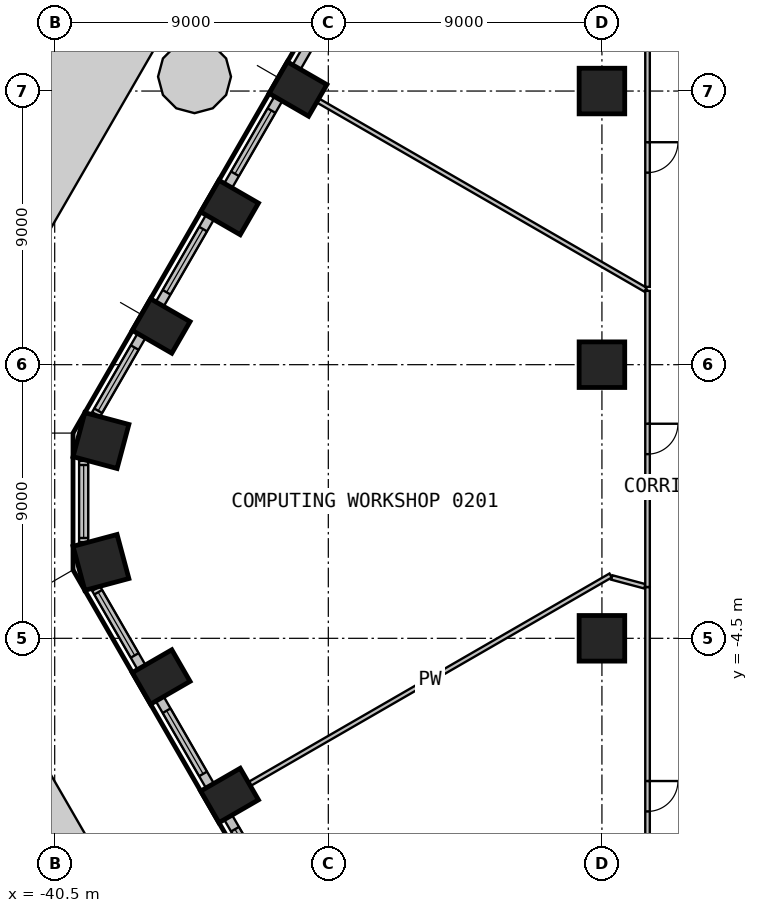
"""IFC4 building model, lengths in metres.
Left out: names, types, materials, properties, quantities, classifications, styles, units other than length and angle.
Written with IfcOpenShell. Run it as: python <this file> out.ifc"""

import sys

from ifc_helpers import new_model, si_unit, direction, frame, frame_2d, origin, origin_2d, place, context, subcontext, project, spatial, polyline, rectangle, circle, outline, extrude, element, fill, save


model = new_model("IFC4")
c1 = context("Model", 3, precision=1e-05, world=origin(), true_north=direction((0.0, 1.0)))
c2 = subcontext(c1, "Body", "Model", "MODEL_VIEW")
j1 = project(units=[si_unit("LENGTHUNIT", "METRE"), si_unit("PLANEANGLEUNIT", "RADIAN")], contexts=[c1])
p1 = place(None, origin())
s1 = spatial("IfcSite", under=j1, at=p1, CompositionType="ELEMENT")
p2 = place(p1, origin())
s2 = spatial("IfcBuilding", under=s1, at=p2, CompositionType="ELEMENT")
p3 = place(p2, frame((0.0, 0.0, 10.8)))
s3 = spatial("IfcBuildingStorey", under=s2, at=p3, CompositionType="ELEMENT", Elevation=10.8)
for number, where, z_axis, x_axis in (
    (1, (-32.498, 13.566, 0.0), (0.0, 0.0, 1.0), (-0.5, -0.866, 0.0)),
    (2, (-34.748, 9.669, 0.0), (0.0, 0.0, 1.0), (-0.5, -0.866, 0.0)),
    (3, (-36.998, 5.772, 0.0), (0.0, 0.0, 1.0), (-0.5, -0.866, 0.0)),
):
    element("IfcColumn", number, at=place(p3, frame(where, z_axis=z_axis, x_axis=x_axis)), inside=s3, PredefinedType="COLUMN", context=c2, shape_type="SweptSolid", body=[
        extrude(rectangle(XDim=1.2, YDim=1.5, at=origin_2d()), origin(), (0.0, 0.0, 1.0), 4.4),
    ])
for number, where, z_axis, x_axis in (
    (4, (-38.979, 2.004, 0.0), (0.0, 0.0, 1.0), (-0.259, -0.966, 0.0)),
    (5, (-38.979, -2.004, 0.0), (0.0, 0.0, 1.0), (0.259, -0.966, 0.0)),
):
    element("IfcColumn", number, at=place(p3, frame(where, z_axis=z_axis, x_axis=x_axis)), inside=s3, PredefinedType="COLUMN", context=c2, shape_type="SweptSolid", body=[
        extrude(rectangle(XDim=1.5, YDim=1.5, at=origin_2d()), origin(), (0.0, 0.0, 1.0), 4.4),
    ])
for number, where, z_axis, x_axis in (
    (6, (-36.998, -5.772, 0.0), (0.0, 0.0, 1.0), (0.5, -0.866, 0.0)),
    (7, (-34.748, -9.669, 0.0), (0.0, 0.0, 1.0), (0.5, -0.866, 0.0)),
):
    element("IfcColumn", number, at=place(p3, frame(where, z_axis=z_axis, x_axis=x_axis)), inside=s3, PredefinedType="COLUMN", context=c2, shape_type="SweptSolid", body=[
        extrude(rectangle(XDim=1.2, YDim=1.5, at=origin_2d()), origin(), (0.0, 0.0, 1.0), 4.4),
    ])
for number, where, z_axis, x_axis in (
    (8, (-22.5, -4.5, 0.0), (0.0, 0.0, 1.0), (1.0, 0.0, 0.0)),
    (9, (-22.5, 4.5, 0.0), (0.0, 0.0, 1.0), (1.0, 0.0, 0.0)),
    (10, (-22.5, 13.5, 0.0), (0.0, 0.0, 1.0), (1.0, 0.0, 0.0)),
):
    element("IfcColumn", number, at=place(p3, frame(where, z_axis=z_axis, x_axis=x_axis)), inside=s3, PredefinedType="COLUMN", context=c2, shape_type="SweptSolid", body=[
        extrude(circle(Radius=0.75, at=origin_2d()), origin(), (0.0, 0.0, 1.0), 4.4),
    ])
p4 = place(p3, frame((-32.544, 14.286, 0.0), z_axis=(0.0, 0.0, 1.0), x_axis=(0.499991515992, 0.866030301974, 0.0)))
e11 = element("IfcWall", 11, at=p4, inside=s3, PredefinedType="SOLIDWALL", context=c2, shape_type="SweptSolid", body=[
    extrude(rectangle(XDim=3.299, YDim=0.3, at=frame_2d((1.649, 0.0))), origin(), (0.0, 0.0, 1.0), 4.4),
])
p5 = place(p4, frame((0.75, 0.0, 0.0)))
e12 = element("IfcOpeningElement", 12, at=p5, cuts=e11, PredefinedType="OPENING", context=c2, shape_type="SweptSolid", body=[
    extrude(rectangle(XDim=1.8, YDim=2.4, at=frame_2d((0.9, 1.2))), frame((0.0, 0.16, 0.0), z_axis=(0.0, -1.0, 0.0), x_axis=(1.0, 0.0, 0.0)), (0.0, 0.0, 1.0), 0.32),
])
p6 = place(p3, frame((-33.144, 13.246, 0.0), z_axis=(0.0, 0.0, 1.0), x_axis=(-0.499991515992, -0.866030301974, 0.0)))
e13 = element("IfcWall", 13, at=p6, inside=s3, PredefinedType="SOLIDWALL", context=c2, shape_type="SweptSolid", body=[
    extrude(rectangle(XDim=3.299, YDim=0.3, at=frame_2d((1.649, 0.0))), origin(), (0.0, 0.0, 1.0), 4.4),
])
p7 = place(p6, frame((0.449, 0.0, 0.9)))
e14 = element("IfcOpeningElement", 14, at=p7, cuts=e13, PredefinedType="OPENING", context=c2, shape_type="SweptSolid", body=[
    extrude(rectangle(XDim=2.4, YDim=3.0, at=frame_2d((1.2, 1.5))), frame((0.0, 0.16, 0.0), z_axis=(0.0, -1.0, 0.0), x_axis=(1.0, 0.0, 0.0)), (0.0, 0.0, 1.0), 0.32),
])
p8 = place(p3, frame((-35.394, 9.349, 0.0), z_axis=(0.0, 0.0, 1.0), x_axis=(-0.499991515992, -0.866030301974, 0.0)))
e15 = element("IfcWall", 15, at=p8, inside=s3, PredefinedType="SOLIDWALL", context=c2, shape_type="SweptSolid", body=[
    extrude(rectangle(XDim=3.299, YDim=0.3, at=frame_2d((1.649, 0.0))), origin(), (0.0, 0.0, 1.0), 4.4),
])
p9 = place(p8, frame((0.449, 0.0, 0.9)))
e16 = element("IfcOpeningElement", 16, at=p9, cuts=e15, PredefinedType="OPENING", context=c2, shape_type="SweptSolid", body=[
    extrude(rectangle(XDim=2.4, YDim=3.0, at=frame_2d((1.2, 1.5))), frame((0.0, 0.16, 0.0), z_axis=(0.0, -1.0, 0.0), x_axis=(1.0, 0.0, 0.0)), (0.0, 0.0, 1.0), 0.32),
])
p10 = place(p3, frame((-37.644, 5.452, 0.0), z_axis=(0.0, 0.0, 1.0), x_axis=(-0.49999586137, -0.866027793211, 0.0)))
e17 = element("IfcWall", 17, at=p10, inside=s3, PredefinedType="SOLIDWALL", context=c2, shape_type="SweptSolid", body=[
    extrude(rectangle(XDim=2.989, YDim=0.3, at=frame_2d((1.494, 0.0))), origin(), (0.0, 0.0, 1.0), 4.4),
])
p11 = place(p10, frame((0.449, 0.0, 0.9)))
e18 = element("IfcOpeningElement", 18, at=p11, cuts=e17, PredefinedType="OPENING", context=c2, shape_type="SweptSolid", body=[
    extrude(rectangle(XDim=2.4, YDim=3.0, at=frame_2d((1.2, 1.5))), frame((0.0, 0.16, 0.0), z_axis=(0.0, -1.0, 0.0), x_axis=(1.0, 0.0, 0.0)), (0.0, 0.0, 1.0), 0.32),
])
p12 = place(p3, frame((-39.547, 1.339, 0.0), z_axis=(0.0, 0.0, 1.0), x_axis=(0.0, -1.0, 0.0)))
e19 = element("IfcWall", 19, at=p12, inside=s3, PredefinedType="SOLIDWALL", context=c2, shape_type="SweptSolid", body=[
    extrude(rectangle(XDim=2.679, YDim=0.3, at=frame_2d((1.339, 0.0))), origin(), (0.0, 0.0, 1.0), 4.4),
])
p13 = place(p12, frame((0.139, 0.0, 0.9)))
e20 = element("IfcOpeningElement", 20, at=p13, cuts=e19, PredefinedType="OPENING", context=c2, shape_type="SweptSolid", body=[
    extrude(rectangle(XDim=2.4, YDim=3.0, at=frame_2d((1.2, 1.5))), frame((0.0, 0.16, 0.0), z_axis=(0.0, -1.0, 0.0), x_axis=(1.0, 0.0, 0.0)), (0.0, 0.0, 1.0), 0.32),
])
p14 = place(p3, frame((-39.139, -2.864, 0.0), z_axis=(0.0, 0.0, 1.0), x_axis=(0.49999586137, -0.866027793211, 0.0)))
e21 = element("IfcWall", 21, at=p14, inside=s3, PredefinedType="SOLIDWALL", context=c2, shape_type="SweptSolid", body=[
    extrude(rectangle(XDim=2.989, YDim=0.3, at=frame_2d((1.494, 0.0))), origin(), (0.0, 0.0, 1.0), 4.4),
])
p15 = place(p14, frame((0.139, 0.0, 0.9)))
e22 = element("IfcOpeningElement", 22, at=p15, cuts=e21, PredefinedType="OPENING", context=c2, shape_type="SweptSolid", body=[
    extrude(rectangle(XDim=2.4, YDim=3.0, at=frame_2d((1.2, 1.5))), frame((0.0, 0.16, 0.0), z_axis=(0.0, -1.0, 0.0), x_axis=(1.0, 0.0, 0.0)), (0.0, 0.0, 1.0), 0.32),
])
p16 = place(p3, frame((-37.044, -6.492, 0.0), z_axis=(0.0, 0.0, 1.0), x_axis=(0.499991515992, -0.866030301974, 0.0)))
e23 = element("IfcWall", 23, at=p16, inside=s3, PredefinedType="SOLIDWALL", context=c2, shape_type="SweptSolid", body=[
    extrude(rectangle(XDim=3.299, YDim=0.3, at=frame_2d((1.649, 0.0))), origin(), (0.0, 0.0, 1.0), 4.4),
])
p17 = place(p16, frame((0.449, 0.0, 0.9)))
e24 = element("IfcOpeningElement", 24, at=p17, cuts=e23, PredefinedType="OPENING", context=c2, shape_type="SweptSolid", body=[
    extrude(rectangle(XDim=2.4, YDim=3.0, at=frame_2d((1.2, 1.5))), frame((0.0, 0.16, 0.0), z_axis=(0.0, -1.0, 0.0), x_axis=(1.0, 0.0, 0.0)), (0.0, 0.0, 1.0), 0.32),
])
p18 = place(p3, frame((-34.794, -10.389, 0.0), z_axis=(0.0, 0.0, 1.0), x_axis=(0.499991515992, -0.866030301974, 0.0)))
e25 = element("IfcWall", 25, at=p18, inside=s3, PredefinedType="SOLIDWALL", context=c2, shape_type="SweptSolid", body=[
    extrude(rectangle(XDim=3.299, YDim=0.3, at=frame_2d((1.649, 0.0))), origin(), (0.0, 0.0, 1.0), 4.4),
])
p19 = place(p18, frame((0.449, 0.0, 0.9)))
e26 = element("IfcOpeningElement", 26, at=p19, cuts=e25, PredefinedType="OPENING", context=c2, shape_type="SweptSolid", body=[
    extrude(rectangle(XDim=2.4, YDim=3.0, at=frame_2d((1.2, 1.5))), frame((0.0, 0.16, 0.0), z_axis=(0.0, -1.0, 0.0), x_axis=(1.0, 0.0, 0.0)), (0.0, 0.0, 1.0), 0.32),
])
p20 = place(p3, origin())
e27 = element("IfcWall", 27, at=p20, inside=s3, PredefinedType="SOLIDWALL", context=c2, shape_type="SweptSolid", body=[
    extrude(outline(polyline([(-52.897, -5.733), (-43.88, -21.351), (-40.416, -19.351), (-48.897, -4.662), (-48.897, 4.662), (-40.416, 19.351), (-43.88, 21.351), (-52.897, 5.733), (-52.897, -5.733)])), origin(), (0.0, 0.0, 1.0), 0.9),
])
p21 = place(p3, origin())
e28 = element("IfcWall", 28, at=p21, inside=s3, PredefinedType="SOLIDWALL", context=c2, shape_type="SweptSolid", body=[
    extrude(outline(polyline([(-46.897, -4.125), (-38.684, -18.351), (-36.086, -16.851), (-43.897, -3.322), (-43.897, 3.322), (-36.086, 16.851), (-38.684, 18.351), (-46.897, 4.125), (-46.897, -4.125)])), origin(), (0.0, 0.0, 1.0), 0.9),
])
p22 = place(p3, origin())
e29 = element("IfcWall", 29, at=p22, inside=s3, PredefinedType="SOLIDWALL", context=c2, shape_type="SweptSolid", body=[
    extrude(outline(polyline([(-34.701, 13.972), (-34.861, 13.372), (-35.301, 12.933), (-35.901, 12.772), (-36.5, 12.933), (-36.94, 13.372), (-37.101, 13.972), (-36.94, 14.572), (-36.5, 15.011), (-35.901, 15.172), (-35.301, 15.011), (-34.861, 14.572), (-34.701, 13.972)])), origin(), (0.0, 0.0, 1.0), 0.6),
])
p23 = place(p3, frame((-22.214, -2.434, 0.0), z_axis=(0.0, 0.0, 1.0), x_axis=(-0.866046135423, -0.499964090029, 0.0)))
e30 = element("IfcWall", 30, at=p23, inside=s3, PredefinedType="PARTITIONING", context=c2, shape_type="SweptSolid", body=[
    extrude(rectangle(XDim=13.702, YDim=0.15, at=frame_2d((6.851, 0.0))), origin(), (0.0, 0.0, 1.0), 4.4),
])
p24 = place(p3, frame((-31.831, 13.181, 0.0), z_axis=(0.0, 0.0, 1.0), x_axis=(0.866028931402, -0.499993889937, 0.0)))
e31 = element("IfcWall", 31, at=p24, inside=s3, PredefinedType="PARTITIONING", context=c2, shape_type="SweptSolid", body=[
    extrude(rectangle(XDim=12.431, YDim=0.15, at=frame_2d((6.216, 0.0))), origin(), (0.0, 0.0, 1.0), 4.4),
])
p25 = place(p3, frame((-21.092, -2.788, 0.0), z_axis=(0.0, 0.0, 1.0), x_axis=(-0.966065265568, 0.25829808877, 0.0)))
e32 = element("IfcWall", 32, at=p25, inside=s3, PredefinedType="PARTITIONING", context=c2, shape_type="SweptSolid", body=[
    extrude(rectangle(XDim=1.124, YDim=0.15, at=frame_2d((0.562, 0.0))), origin(), (0.0, 0.0, 1.0), 4.4),
])
p26 = place(p3, frame((-21.0, -2.813, 0.0), z_axis=(0.0, 0.0, 1.0), x_axis=(0.0, -1.0, 0.0)))
e33 = element("IfcWall", 33, at=p26, inside=s3, PredefinedType="PARTITIONING", context=c2, shape_type="SweptSolid", body=[
    extrude(rectangle(XDim=13.762, YDim=0.15, at=frame_2d((6.881, 0.0))), origin(), (0.0, 0.0, 1.0), 4.4),
])
p27 = place(p26, frame((6.381, 0.0, 0.0)))
e34 = element("IfcOpeningElement", 34, at=p27, cuts=e33, PredefinedType="OPENING", context=c2, shape_type="SweptSolid", body=[
    extrude(rectangle(XDim=1.0, YDim=2.1, at=frame_2d((0.5, 1.05))), frame((0.0, 0.085, 0.0), z_axis=(0.0, -1.0, 0.0), x_axis=(1.0, 0.0, 0.0)), (0.0, 0.0, 1.0), 0.17),
])
p28 = place(p3, frame((-21.0, 6.928, 0.0), z_axis=(0.0, 0.0, 1.0), x_axis=(0.0, -1.0, 0.0)))
e35 = element("IfcWall", 35, at=p28, inside=s3, PredefinedType="PARTITIONING", context=c2, shape_type="SweptSolid", body=[
    extrude(rectangle(XDim=9.741, YDim=0.15, at=frame_2d((4.871, 0.0))), origin(), (0.0, 0.0, 1.0), 4.4),
])
p29 = place(p28, frame((4.371, 0.0, 0.0)))
e36 = element("IfcOpeningElement", 36, at=p29, cuts=e35, PredefinedType="OPENING", context=c2, shape_type="SweptSolid", body=[
    extrude(rectangle(XDim=1.0, YDim=2.1, at=frame_2d((0.5, 1.05))), frame((0.0, 0.085, 0.0), z_axis=(0.0, -1.0, 0.0), x_axis=(1.0, 0.0, 0.0)), (0.0, 0.0, 1.0), 0.17),
])
p30 = place(p3, frame((-21.0, 16.575, 0.0), z_axis=(0.0, 0.0, 1.0), x_axis=(0.0, -1.0, 0.0)))
e37 = element("IfcWall", 37, at=p30, inside=s3, PredefinedType="PARTITIONING", context=c2, shape_type="SweptSolid", body=[
    extrude(rectangle(XDim=9.517, YDim=0.15, at=frame_2d((4.758, 0.0))), origin(), (0.0, 0.0, 1.0), 4.4),
])
p31 = place(p30, frame((4.759, 0.0, 0.0)))
e38 = element("IfcOpeningElement", 38, at=p31, cuts=e37, PredefinedType="OPENING", context=c2, shape_type="SweptSolid", body=[
    extrude(rectangle(XDim=1.0, YDim=2.1, at=frame_2d((0.5, 1.05))), frame((0.0, 0.085, 0.0), z_axis=(0.0, -1.0, 0.0), x_axis=(1.0, 0.0, 0.0)), (0.0, 0.0, 1.0), 0.17),
])
p32 = place(p7, origin())
e39 = element("IfcWindow", 39, at=p32, inside=s3, PartitioningType="SINGLE_PANEL", PredefinedType="WINDOW", context=c2, shape_type="SweptSolid", body=[
    extrude(rectangle(XDim=2.4, YDim=3.0, at=frame_2d((1.2, 1.5))), frame((0.0, 0.03, 0.0), z_axis=(0.0, -1.0, 0.0), x_axis=(1.0, 0.0, 0.0)), (0.0, 0.0, 1.0), 0.06),
])
fill(e14, e39)
p33 = place(p9, origin())
e40 = element("IfcWindow", 40, at=p33, inside=s3, PartitioningType="SINGLE_PANEL", PredefinedType="WINDOW", context=c2, shape_type="SweptSolid", body=[
    extrude(rectangle(XDim=2.4, YDim=3.0, at=frame_2d((1.2, 1.5))), frame((0.0, 0.03, 0.0), z_axis=(0.0, -1.0, 0.0), x_axis=(1.0, 0.0, 0.0)), (0.0, 0.0, 1.0), 0.06),
])
fill(e16, e40)
p34 = place(p11, origin())
e41 = element("IfcWindow", 41, at=p34, inside=s3, PartitioningType="SINGLE_PANEL", PredefinedType="WINDOW", context=c2, shape_type="SweptSolid", body=[
    extrude(rectangle(XDim=2.4, YDim=3.0, at=frame_2d((1.2, 1.5))), frame((0.0, 0.03, 0.0), z_axis=(0.0, -1.0, 0.0), x_axis=(1.0, 0.0, 0.0)), (0.0, 0.0, 1.0), 0.06),
])
fill(e18, e41)
p35 = place(p13, origin())
e42 = element("IfcWindow", 42, at=p35, inside=s3, PartitioningType="SINGLE_PANEL", PredefinedType="WINDOW", context=c2, shape_type="SweptSolid", body=[
    extrude(rectangle(XDim=2.4, YDim=3.0, at=frame_2d((1.2, 1.5))), frame((0.0, 0.03, 0.0), z_axis=(0.0, -1.0, 0.0), x_axis=(1.0, 0.0, 0.0)), (0.0, 0.0, 1.0), 0.06),
])
fill(e20, e42)
p36 = place(p15, origin())
e43 = element("IfcWindow", 43, at=p36, inside=s3, PartitioningType="SINGLE_PANEL", PredefinedType="WINDOW", context=c2, shape_type="SweptSolid", body=[
    extrude(rectangle(XDim=2.4, YDim=3.0, at=frame_2d((1.2, 1.5))), frame((0.0, 0.03, 0.0), z_axis=(0.0, -1.0, 0.0), x_axis=(1.0, 0.0, 0.0)), (0.0, 0.0, 1.0), 0.06),
])
fill(e22, e43)
p37 = place(p17, origin())
e44 = element("IfcWindow", 44, at=p37, inside=s3, PartitioningType="SINGLE_PANEL", PredefinedType="WINDOW", context=c2, shape_type="SweptSolid", body=[
    extrude(rectangle(XDim=2.4, YDim=3.0, at=frame_2d((1.2, 1.5))), frame((0.0, 0.03, 0.0), z_axis=(0.0, -1.0, 0.0), x_axis=(1.0, 0.0, 0.0)), (0.0, 0.0, 1.0), 0.06),
])
fill(e24, e44)
p38 = place(p19, origin())
e45 = element("IfcWindow", 45, at=p38, inside=s3, PartitioningType="SINGLE_PANEL", PredefinedType="WINDOW", context=c2, shape_type="SweptSolid", body=[
    extrude(rectangle(XDim=2.4, YDim=3.0, at=frame_2d((1.2, 1.5))), frame((0.0, 0.03, 0.0), z_axis=(0.0, -1.0, 0.0), x_axis=(1.0, 0.0, 0.0)), (0.0, 0.0, 1.0), 0.06),
])
fill(e26, e45)
p39 = place(p29, origin())
e46 = element("IfcDoor", 46, at=p39, inside=s3, OperationType="SINGLE_SWING_RIGHT", PredefinedType="DOOR", context=c2, shape_type="SweptSolid", body=[
    extrude(rectangle(XDim=1.0, YDim=2.1, at=frame_2d((0.5, 1.05))), frame((0.0, 0.025, 0.0), z_axis=(0.0, -1.0, 0.0), x_axis=(1.0, 0.0, 0.0)), (0.0, 0.0, 1.0), 0.05),
])
fill(e36, e46)
p40 = place(p27, origin())
e47 = element("IfcDoor", 47, at=p40, inside=s3, OperationType="SINGLE_SWING_LEFT", PredefinedType="DOOR", context=c2, shape_type="SweptSolid", body=[
    extrude(rectangle(XDim=1.0, YDim=2.1, at=frame_2d((0.5, 1.05))), frame((0.0, 0.025, 0.0), z_axis=(0.0, -1.0, 0.0), x_axis=(1.0, 0.0, 0.0)), (0.0, 0.0, 1.0), 0.05),
])
fill(e34, e47)
p41 = place(p31, origin())
e48 = element("IfcDoor", 48, at=p41, inside=s3, OperationType="SINGLE_SWING_RIGHT", PredefinedType="DOOR", context=c2, shape_type="SweptSolid", body=[
    extrude(rectangle(XDim=1.0, YDim=2.1, at=frame_2d((0.5, 1.05))), frame((0.0, 0.025, 0.0), z_axis=(0.0, -1.0, 0.0), x_axis=(1.0, 0.0, 0.0)), (0.0, 0.0, 1.0), 0.05),
])
fill(e38, e48)
save(model, sys.argv[1])
